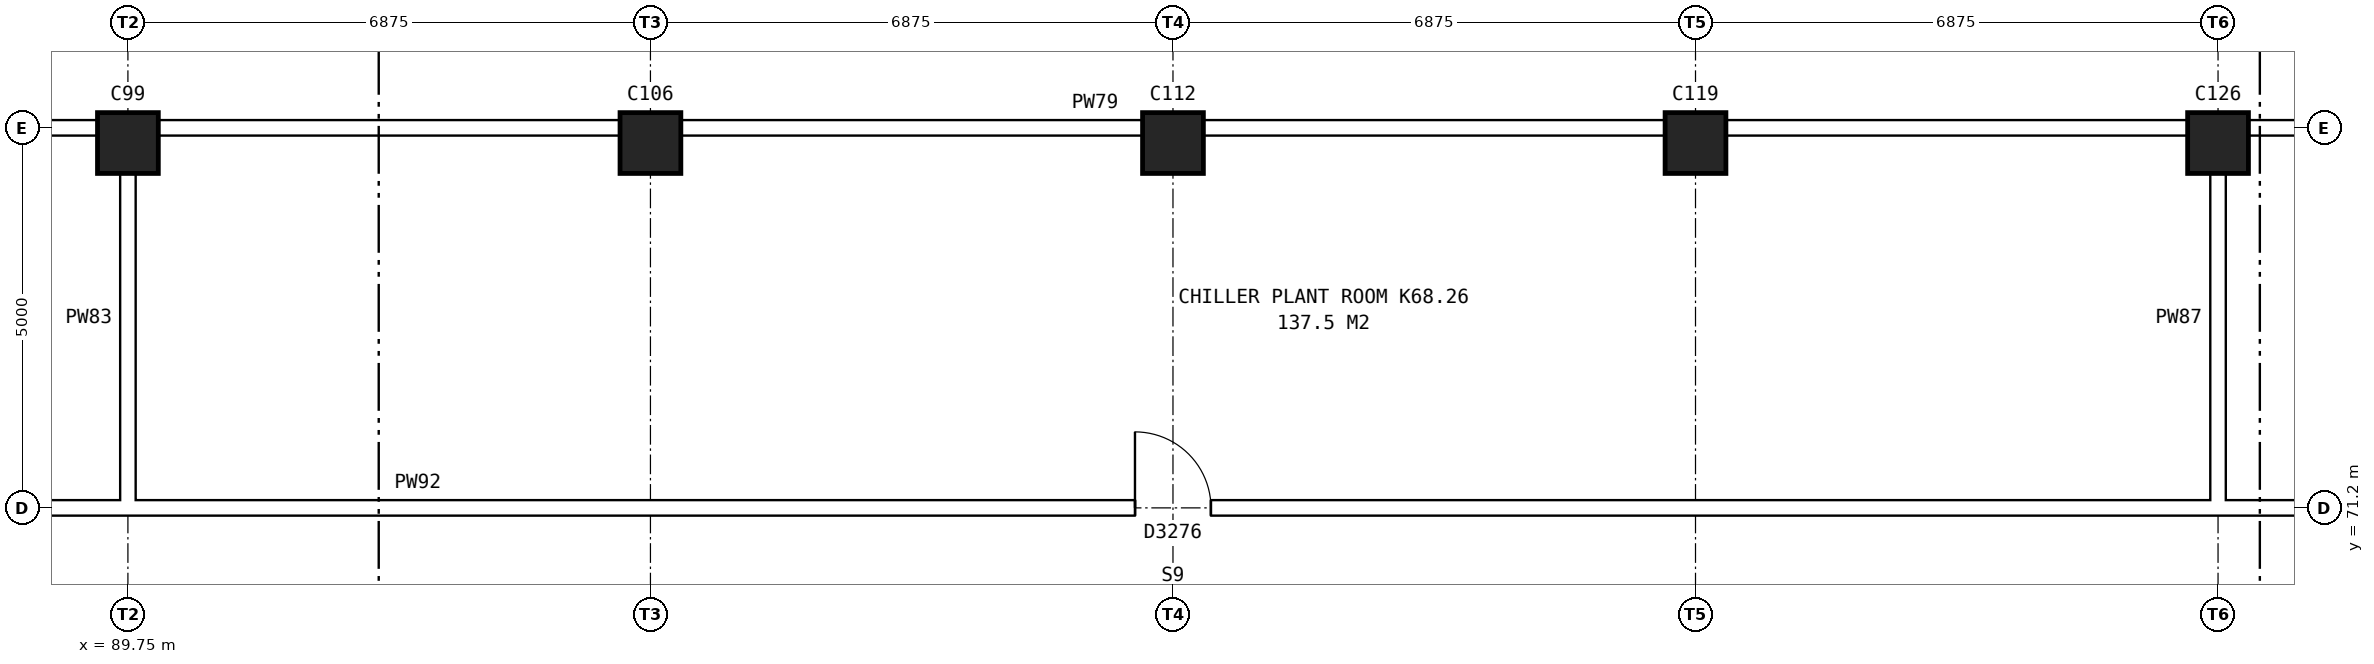
"""IFC4 building model, lengths in metres.
Left out: names, types, materials, properties, quantities, classifications, styles, units other than length and angle.
Written with IfcOpenShell. Run it as: python <this file> out.ifc"""

import sys

from ifc_helpers import new_model, si_unit, direction, frame, frame_2d, origin, origin_2d, place, context, subcontext, project, spatial, rectangle, hollow_rectangle, extrude, element, fill, save


model = new_model("IFC4")
c1 = context("Model", 3, precision=1e-05, world=origin(), true_north=direction((0.0, 1.0)))
c2 = subcontext(c1, "Body", "Model", "MODEL_VIEW")
j1 = project(units=[si_unit("LENGTHUNIT", "METRE"), si_unit("PLANEANGLEUNIT", "RADIAN")], contexts=[c1])
p1 = place(None, origin())
s1 = spatial("IfcSite", under=j1, at=p1, CompositionType="ELEMENT")
p2 = place(p1, origin())
s2 = spatial("IfcBuilding", under=s1, at=p2, CompositionType="ELEMENT")
p3 = place(p2, frame((0.0, 0.0, 243.9)))
s3 = spatial("IfcBuildingStorey", under=s2, at=p3, CompositionType="ELEMENT", Elevation=243.9)
for number, where, z_axis, x_axis in (
    (1, (89.75, 76.0, 0.0), (0.0, 0.0, 1.0), (1.0, 0.0, 0.0)),
    (2, (96.625, 76.0, 0.0), (0.0, 0.0, 1.0), (1.0, 0.0, 0.0)),
    (3, (103.5, 76.0, 0.0), (0.0, 0.0, 1.0), (1.0, 0.0, 0.0)),
    (4, (110.375, 76.0, 0.0), (0.0, 0.0, 1.0), (1.0, 0.0, 0.0)),
    (5, (117.25, 76.0, 0.0), (0.0, 0.0, 1.0), (1.0, 0.0, 0.0)),
):
    element("IfcColumn", number, at=place(p3, frame(where, z_axis=z_axis, x_axis=x_axis)), inside=s3, PredefinedType="COLUMN", context=c2, shape_type="SweptSolid", body=[
        extrude(hollow_rectangle(XDim=0.8, YDim=0.8, WallThickness=0.033, at=origin_2d()), origin(), (0.0, 0.0, 1.0), 13.763),
    ])
p4 = place(p3, frame((75.64, 71.2, 0.0), z_axis=(0.0, 0.0, 1.0), x_axis=(1.0, 0.0, 0.0)))
e6 = element("IfcWall", 6, at=p4, inside=s3, PredefinedType="PARTITIONING", context=c2, shape_type="SweptSolid", body=[
    extrude(rectangle(XDim=55.72, YDim=0.2, at=frame_2d((27.86, 0.0))), origin(), (0.0, 0.0, 1.0), 3.3),
])
p5 = place(p4, frame((6.555, 0.0, 0.0)))
e7 = element("IfcOpeningElement", 7, at=p5, cuts=e6, PredefinedType="OPENING", context=c2, shape_type="SweptSolid", body=[
    extrude(rectangle(XDim=1.0, YDim=2.1, at=frame_2d((0.5, 1.05))), frame((0.0, 0.11, 0.0), z_axis=(0.0, -1.0, 0.0), x_axis=(1.0, 0.0, 0.0)), (0.0, 0.0, 1.0), 0.22),
])
p6 = place(p4, frame((27.36, 0.0, 0.0)))
e8 = element("IfcOpeningElement", 8, at=p6, cuts=e6, PredefinedType="OPENING", context=c2, shape_type="SweptSolid", body=[
    extrude(rectangle(XDim=1.0, YDim=2.1, at=frame_2d((0.5, 1.05))), frame((0.0, 0.11, 0.0), z_axis=(0.0, -1.0, 0.0), x_axis=(1.0, 0.0, 0.0)), (0.0, 0.0, 1.0), 0.22),
])
p7 = place(p4, frame((48.165, 0.0, 0.0)))
e9 = element("IfcOpeningElement", 9, at=p7, cuts=e6, PredefinedType="OPENING", context=c2, shape_type="SweptSolid", body=[
    extrude(rectangle(XDim=1.0, YDim=2.1, at=frame_2d((0.5, 1.05))), frame((0.0, 0.11, 0.0), z_axis=(0.0, -1.0, 0.0), x_axis=(1.0, 0.0, 0.0)), (0.0, 0.0, 1.0), 0.22),
])
p8 = place(p3, frame((75.64, 76.2, 0.0), z_axis=(0.0, 0.0, 1.0), x_axis=(1.0, 0.0, 0.0)))
e10 = element("IfcWall", 10, at=p8, inside=s3, PredefinedType="PARTITIONING", context=c2, shape_type="SweptSolid", body=[
    extrude(rectangle(XDim=55.72, YDim=0.2, at=frame_2d((27.86, 0.0))), origin(), (0.0, 0.0, 1.0), 3.3),
])
for number, where, z_axis, x_axis in (
    (11, (89.75, 71.1, 0.0), (0.0, 0.0, 1.0), (0.0, 1.0, 0.0)),
    (12, (117.25, 71.1, 0.0), (0.0, 0.0, 1.0), (0.0, 1.0, 0.0)),
):
    element("IfcWall", number, at=place(p3, frame(where, z_axis=z_axis, x_axis=x_axis)), inside=s3, PredefinedType="PARTITIONING", context=c2, shape_type="SweptSolid", body=[
        extrude(rectangle(XDim=5.2, YDim=0.2, at=frame_2d((2.6, 0.0))), origin(), (0.0, 0.0, 1.0), 3.3),
    ])
p9 = place(p6, origin())
e13 = element("IfcDoor", 13, at=p9, inside=s3, OperationType="SINGLE_SWING_LEFT", PredefinedType="DOOR", context=c2, shape_type="SweptSolid", body=[
    extrude(rectangle(XDim=1.0, YDim=2.1, at=frame_2d((0.5, 1.05))), frame((0.0, 0.025, 0.0), z_axis=(0.0, -1.0, 0.0), x_axis=(1.0, 0.0, 0.0)), (0.0, 0.0, 1.0), 0.05),
])
fill(e8, e13)
save(model, sys.argv[1])
